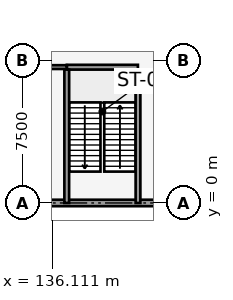
"""IFC4 building model, lengths in metres.
Left out: names, types, materials, properties, quantities, classifications, styles, units other than length and angle.
Written with IfcOpenShell. Run it as: python <this file> out.ifc"""

import sys

from ifc_helpers import new_model, si_unit, direction, frame, frame_2d, origin, place, context, subcontext, project, spatial, rectangle, extrude, element, fill, save


model = new_model("IFC4")
c1 = context("Model", 3, precision=1e-05, world=origin(), true_north=direction((0.0, 1.0)))
c2 = subcontext(c1, "Body", "Model", "MODEL_VIEW")
j1 = project(units=[si_unit("LENGTHUNIT", "METRE"), si_unit("PLANEANGLEUNIT", "RADIAN")], contexts=[c1])
p1 = place(None, origin())
s1 = spatial("IfcSite", under=j1, at=p1, CompositionType="ELEMENT")
p2 = place(p1, origin())
s2 = spatial("IfcBuilding", under=s1, at=p2, CompositionType="ELEMENT")
p3 = place(p2, origin())
s3 = spatial("IfcBuildingStorey", under=s2, at=p3, CompositionType="ELEMENT", Elevation=0.0)
p4 = place(p3, frame((135.455, 0.0, 0.0), z_axis=(0.0, 0.0, 1.0), x_axis=(1.0, 0.0, 0.0)))
e1 = element("IfcWall", 1, at=p4, inside=s3, PredefinedType="SOLIDWALL", context=c2, shape_type="SweptSolid", body=[
    extrude(rectangle(XDim=6.59, YDim=0.34, at=frame_2d((3.295, 0.0))), origin(), (0.0, 0.0, 1.0), 3.72),
])
p5 = place(p4, frame((2.182, 0.0, 0.0)))
e2 = element("IfcOpeningElement", 2, at=p5, cuts=e1, PredefinedType="OPENING", context=c2, shape_type="SweptSolid", body=[
    extrude(rectangle(XDim=1.6, YDim=2.15, at=frame_2d((0.8, 1.075))), frame((0.0, 0.18, 0.0), z_axis=(0.0, -1.0, 0.0), x_axis=(1.0, 0.0, 0.0)), (0.0, 0.0, 1.0), 0.36),
])
p6 = place(p3, frame((136.88, 7.145, 0.0), z_axis=(0.0, 0.0, 1.0), x_axis=(1.0, 0.0, 0.0)))
e3 = element("IfcWall", 3, at=p6, inside=s3, PredefinedType="SOLIDWALL", context=c2, shape_type="SweptSolid", body=[
    extrude(rectangle(XDim=3.74, YDim=0.25, at=frame_2d((1.87, 0.0))), origin(), (0.0, 0.0, 1.0), 4.5),
])
p7 = place(p3, frame((136.875, 0.0, 0.0), z_axis=(0.0, 0.0, 1.0), x_axis=(0.0, 1.0, 0.0)))
e4 = element("IfcWall", 4, at=p7, inside=s3, PredefinedType="SOLIDWALL", context=c2, shape_type="SweptSolid", body=[
    extrude(rectangle(XDim=7.02, YDim=0.25, at=frame_2d((3.51, 0.0))), origin(), (0.0, 0.0, 1.0), 4.5),
])
p8 = place(p3, frame((140.625, 0.0, 0.0), z_axis=(0.0, 0.0, 1.0), x_axis=(0.0, 1.0, 0.0)))
e5 = element("IfcWall", 5, at=p8, inside=s3, PredefinedType="SOLIDWALL", context=c2, shape_type="SweptSolid", body=[
    extrude(rectangle(XDim=7.02, YDim=0.25, at=frame_2d((3.51, 0.0))), origin(), (0.0, 0.0, 1.0), 4.5),
])
p9 = place(p8, frame((0.45, 0.0, 0.0)))
e6 = element("IfcOpeningElement", 6, at=p9, cuts=e5, PredefinedType="OPENING", context=c2, shape_type="SweptSolid", body=[
    extrude(rectangle(XDim=1.1, YDim=2.15, at=frame_2d((0.55, 1.075))), frame((0.0, 0.135, 0.0), z_axis=(0.0, -1.0, 0.0), x_axis=(1.0, 0.0, 0.0)), (0.0, 0.0, 1.0), 0.27),
])
p10 = place(p3, frame((135.364, 7.15, 0.0), z_axis=(0.0, 0.0, 1.0), x_axis=(1.0, 0.0, 0.0)))
e7 = element("IfcWall", 7, at=p10, inside=s3, PredefinedType="PARTITIONING", context=c2, shape_type="SweptSolid", body=[
    extrude(rectangle(XDim=1.516, YDim=0.2, at=frame_2d((0.758, 0.0))), origin(), (0.0, 0.0, 1.0), 3.52),
])
p11 = place(p5, frame((1.6, 0.0, 0.0), z_axis=(0.0, 0.0, 1.0), x_axis=(-1.0, 0.0, 0.0)))
e8 = element("IfcDoor", 8, at=p11, inside=s3, OperationType="SINGLE_SWING_RIGHT", PredefinedType="DOOR", context=c2, shape_type="SweptSolid", body=[
    extrude(rectangle(XDim=1.6, YDim=2.15, at=frame_2d((0.8, 1.075))), frame((0.0, 0.025, 0.0), z_axis=(0.0, -1.0, 0.0), x_axis=(1.0, 0.0, 0.0)), (0.0, 0.0, 1.0), 0.05),
])
fill(e2, e8)
p12 = place(p9, origin())
e9 = element("IfcDoor", 9, at=p12, inside=s3, OperationType="SINGLE_SWING_LEFT", PredefinedType="DOOR", context=c2, shape_type="SweptSolid", body=[
    extrude(rectangle(XDim=1.1, YDim=2.15, at=frame_2d((0.55, 1.075))), frame((0.0, 0.025, 0.0), z_axis=(0.0, -1.0, 0.0), x_axis=(1.0, 0.0, 0.0)), (0.0, 0.0, 1.0), 0.05),
])
fill(e6, e9)
save(model, sys.argv[1])
